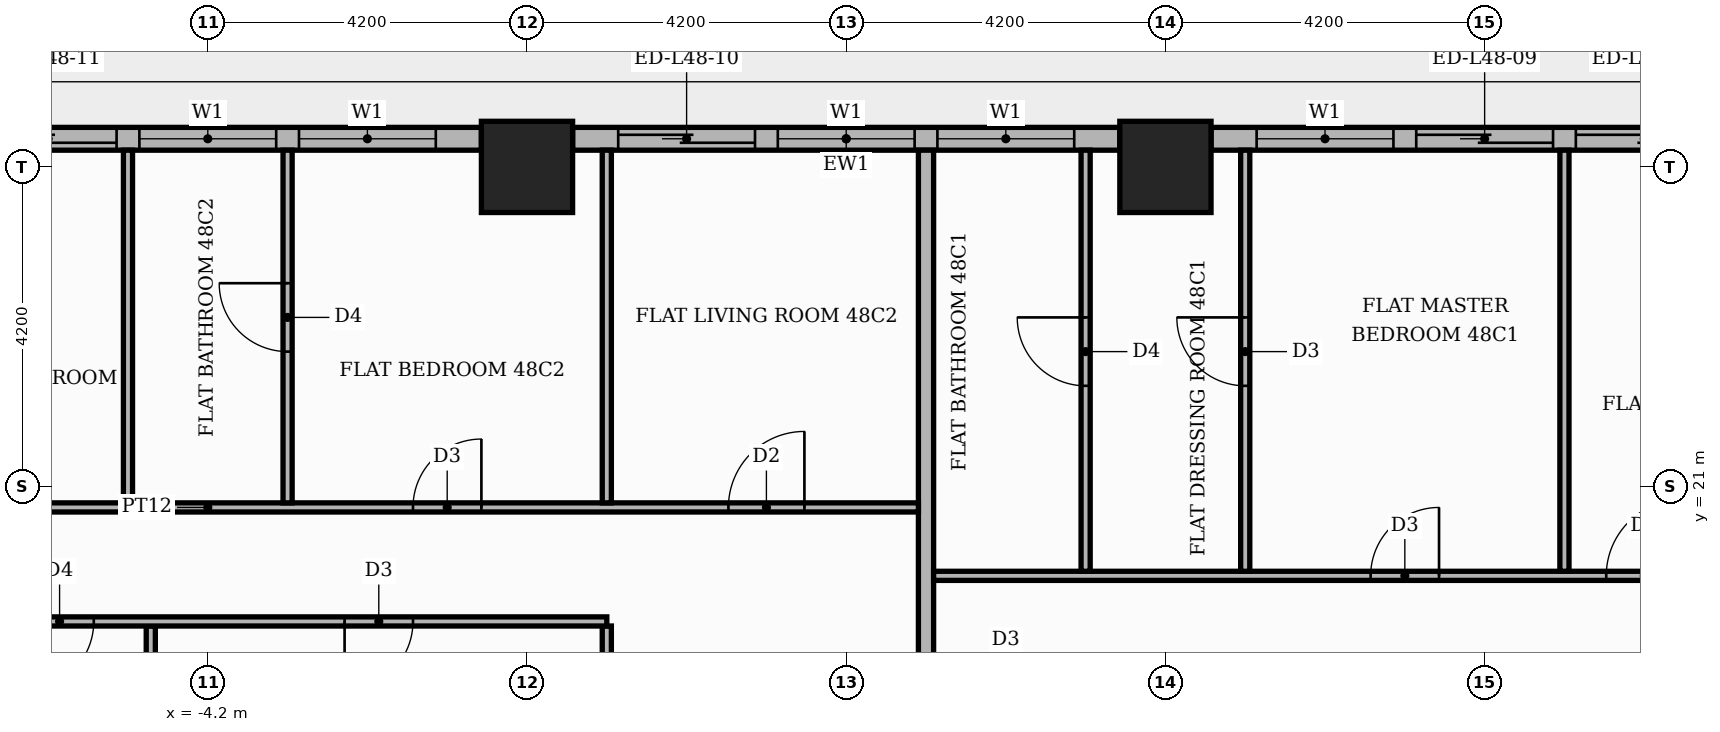
"""IFC4 building model, lengths in metres.
Left out: names, types, materials, properties, quantities, classifications, styles, units other than length and angle.
Written with IfcOpenShell. Run it as: python <this file> out.ifc"""

import sys

from ifc_helpers import new_model, si_unit, direction, frame, frame_2d, origin, origin_2d, place, context, subcontext, project, spatial, rectangle, extrude, element, fill, save


model = new_model("IFC4")
c1 = context("Model", 3, precision=1e-05, world=origin(), true_north=direction((0.0, 1.0)))
c2 = subcontext(c1, "Body", "Model", "MODEL_VIEW")
j1 = project(units=[si_unit("LENGTHUNIT", "METRE"), si_unit("PLANEANGLEUNIT", "RADIAN")], contexts=[c1])
p1 = place(None, origin())
s1 = spatial("IfcSite", under=j1, at=p1, CompositionType="ELEMENT")
p2 = place(p1, origin())
s2 = spatial("IfcBuilding", under=s1, at=p2, CompositionType="ELEMENT")
p3 = place(p2, frame((0.0, 0.0, 204.0)))
s3 = spatial("IfcBuildingStorey", under=s2, at=p3, CompositionType="ELEMENT", Elevation=204.0)
for number, where, z_axis, x_axis in (
    (1, (0.0, 25.2, 0.0), (0.0, 0.0, 1.0), (1.0, 0.0, 0.0)),
    (2, (8.4, 25.2, 0.0), (0.0, 0.0, 1.0), (1.0, 0.0, 0.0)),
):
    element("IfcColumn", number, at=place(p3, frame(where, z_axis=z_axis, x_axis=x_axis)), inside=s3, PredefinedType="COLUMN", context=c2, shape_type="SweptSolid", body=[
        extrude(rectangle(XDim=1.2, YDim=1.2, at=origin_2d()), origin(), (0.0, 0.0, 1.0), 3.9),
    ])
p4 = place(p3, frame((16.2, 25.57, 0.0), z_axis=(0.0, 0.0, 1.0), x_axis=(-1.0, 0.0, 0.0)))
e3 = element("IfcWall", 3, at=p4, inside=s3, PredefinedType="STANDARD", context=c2, shape_type="SweptSolid", body=[
    extrude(rectangle(XDim=7.2, YDim=0.3, at=frame_2d((3.6, 0.0))), origin(), (0.0, 0.0, 1.0), 3.48),
])
p5 = place(p4, frame((0.6, 0.0, 0.0)))
e4 = element("IfcOpeningElement", 4, at=p5, cuts=e3, PredefinedType="OPENING", context=c2, shape_type="SweptSolid", body=[
    extrude(rectangle(XDim=1.8, YDim=2.4, at=frame_2d((0.9, 1.2))), frame((0.0, 0.16, 0.0), z_axis=(0.0, -1.0, 0.0), x_axis=(1.0, 0.0, 0.0)), (0.0, 0.0, 1.0), 0.32),
])
p6 = place(p4, frame((2.7, 0.0, 0.0)))
e5 = element("IfcOpeningElement", 5, at=p6, cuts=e3, PredefinedType="OPENING", context=c2, shape_type="SweptSolid", body=[
    extrude(rectangle(XDim=1.8, YDim=2.4, at=frame_2d((0.9, 1.2))), frame((0.0, 0.16, 0.0), z_axis=(0.0, -1.0, 0.0), x_axis=(1.0, 0.0, 0.0)), (0.0, 0.0, 1.0), 0.32),
])
p7 = place(p4, frame((4.8, 0.0, 0.9)))
e6 = element("IfcOpeningElement", 6, at=p7, cuts=e3, PredefinedType="OPENING", context=c2, shape_type="SweptSolid", body=[
    extrude(rectangle(XDim=1.8, YDim=2.1, at=frame_2d((0.9, 1.05))), frame((0.0, 0.16, 0.0), z_axis=(0.0, -1.0, 0.0), x_axis=(1.0, 0.0, 0.0)), (0.0, 0.0, 1.0), 0.32),
])
p8 = place(p3, frame((7.8, 25.57, 0.0), z_axis=(0.0, 0.0, 1.0), x_axis=(-1.0, 0.0, 0.0)))
e7 = element("IfcWall", 7, at=p8, inside=s3, PredefinedType="STANDARD", context=c2, shape_type="SweptSolid", body=[
    extrude(rectangle(XDim=7.2, YDim=0.3, at=frame_2d((3.6, 0.0))), origin(), (0.0, 0.0, 1.0), 3.48),
])
p9 = place(p8, frame((0.6, 0.0, 0.9)))
e8 = element("IfcOpeningElement", 8, at=p9, cuts=e7, PredefinedType="OPENING", context=c2, shape_type="SweptSolid", body=[
    extrude(rectangle(XDim=1.8, YDim=2.1, at=frame_2d((0.9, 1.05))), frame((0.0, 0.16, 0.0), z_axis=(0.0, -1.0, 0.0), x_axis=(1.0, 0.0, 0.0)), (0.0, 0.0, 1.0), 0.32),
])
p10 = place(p8, frame((2.7, 0.0, 0.9)))
e9 = element("IfcOpeningElement", 9, at=p10, cuts=e7, PredefinedType="OPENING", context=c2, shape_type="SweptSolid", body=[
    extrude(rectangle(XDim=1.8, YDim=2.1, at=frame_2d((0.9, 1.05))), frame((0.0, 0.16, 0.0), z_axis=(0.0, -1.0, 0.0), x_axis=(1.0, 0.0, 0.0)), (0.0, 0.0, 1.0), 0.32),
])
p11 = place(p8, frame((4.8, 0.0, 0.0)))
e10 = element("IfcOpeningElement", 10, at=p11, cuts=e7, PredefinedType="OPENING", context=c2, shape_type="SweptSolid", body=[
    extrude(rectangle(XDim=1.8, YDim=2.4, at=frame_2d((0.9, 1.2))), frame((0.0, 0.16, 0.0), z_axis=(0.0, -1.0, 0.0), x_axis=(1.0, 0.0, 0.0)), (0.0, 0.0, 1.0), 0.32),
])
p12 = place(p3, frame((-0.6, 25.57, 0.0), z_axis=(0.0, 0.0, 1.0), x_axis=(-1.0, 0.0, 0.0)))
e11 = element("IfcWall", 11, at=p12, inside=s3, PredefinedType="STANDARD", context=c2, shape_type="SweptSolid", body=[
    extrude(rectangle(XDim=7.2, YDim=0.3, at=frame_2d((3.6, 0.0))), origin(), (0.0, 0.0, 1.0), 3.48),
])
p13 = place(p12, frame((0.6, 0.0, 0.9)))
e12 = element("IfcOpeningElement", 12, at=p13, cuts=e11, PredefinedType="OPENING", context=c2, shape_type="SweptSolid", body=[
    extrude(rectangle(XDim=1.8, YDim=2.1, at=frame_2d((0.9, 1.05))), frame((0.0, 0.16, 0.0), z_axis=(0.0, -1.0, 0.0), x_axis=(1.0, 0.0, 0.0)), (0.0, 0.0, 1.0), 0.32),
])
p14 = place(p12, frame((2.7, 0.0, 0.9)))
e13 = element("IfcOpeningElement", 13, at=p14, cuts=e11, PredefinedType="OPENING", context=c2, shape_type="SweptSolid", body=[
    extrude(rectangle(XDim=1.8, YDim=2.1, at=frame_2d((0.9, 1.05))), frame((0.0, 0.16, 0.0), z_axis=(0.0, -1.0, 0.0), x_axis=(1.0, 0.0, 0.0)), (0.0, 0.0, 1.0), 0.32),
])
p15 = place(p12, frame((4.8, 0.0, 0.0)))
e14 = element("IfcOpeningElement", 14, at=p15, cuts=e11, PredefinedType="OPENING", context=c2, shape_type="SweptSolid", body=[
    extrude(rectangle(XDim=1.8, YDim=2.4, at=frame_2d((0.9, 1.2))), frame((0.0, 0.16, 0.0), z_axis=(0.0, -1.0, 0.0), x_axis=(1.0, 0.0, 0.0)), (0.0, 0.0, 1.0), 0.32),
])
for number, where, z_axis, x_axis in (
    (15, (-4.95, 13.75, 0.0), (0.0, 0.0, 1.0), (0.0, 1.0, 0.0)),
    (16, (1.05, 13.75, 0.0), (0.0, 0.0, 1.0), (0.0, 1.0, 0.0)),
):
    element("IfcWall", number, at=place(p3, frame(where, z_axis=z_axis, x_axis=x_axis)), inside=s3, PredefinedType="PARTITIONING", context=c2, shape_type="SweptSolid", body=[
        extrude(rectangle(XDim=5.41, YDim=0.12, at=frame_2d((2.705, 0.0))), origin(), (0.0, 0.0, 1.0), 3.48),
    ])
p16 = place(p3, frame((5.25, 13.75, 0.0), z_axis=(0.0, 0.0, 1.0), x_axis=(0.0, 1.0, 0.0)))
e17 = element("IfcWall", 17, at=p16, inside=s3, PredefinedType="PARTITIONING", context=c2, shape_type="SweptSolid", body=[
    extrude(rectangle(XDim=11.67, YDim=0.2, at=frame_2d((5.835, 0.0))), origin(), (0.0, 0.0, 1.0), 3.48),
])
p17 = place(p3, frame((-13.55, 19.22, 0.0), z_axis=(0.0, 0.0, 1.0), x_axis=(1.0, 0.0, 0.0)))
e18 = element("IfcWall", 18, at=p17, inside=s3, PredefinedType="PARTITIONING", context=c2, shape_type="SweptSolid", body=[
    extrude(rectangle(XDim=14.6, YDim=0.12, at=frame_2d((7.3, 0.0))), origin(), (0.0, 0.0, 1.0), 3.48),
])
p18 = place(p17, frame((11.15, 0.0, 0.0)))
e19 = element("IfcOpeningElement", 19, at=p18, cuts=e18, PredefinedType="OPENING", context=c2, shape_type="SweptSolid", body=[
    extrude(rectangle(XDim=0.9, YDim=2.1, at=frame_2d((0.45, 1.05))), frame((0.0, 0.07, 0.0), z_axis=(0.0, -1.0, 0.0), x_axis=(1.0, 0.0, 0.0)), (0.0, 0.0, 1.0), 0.14),
])
p19 = place(p17, frame((6.95, 0.0, 0.0)))
e20 = element("IfcOpeningElement", 20, at=p19, cuts=e18, PredefinedType="OPENING", context=c2, shape_type="SweptSolid", body=[
    extrude(rectangle(XDim=0.9, YDim=2.1, at=frame_2d((0.45, 1.05))), frame((0.0, 0.07, 0.0), z_axis=(0.0, -1.0, 0.0), x_axis=(1.0, 0.0, 0.0)), (0.0, 0.0, 1.0), 0.14),
])
p20 = place(p17, frame((3.95, 0.0, 0.0)))
e21 = element("IfcOpeningElement", 21, at=p20, cuts=e18, PredefinedType="OPENING", context=c2, shape_type="SweptSolid", body=[
    extrude(rectangle(XDim=0.9, YDim=2.1, at=frame_2d((0.45, 1.05))), frame((0.0, 0.07, 0.0), z_axis=(0.0, -1.0, 0.0), x_axis=(1.0, 0.0, 0.0)), (0.0, 0.0, 1.0), 0.14),
])
p21 = place(p17, frame((0.8, 0.0, 0.0)))
e22 = element("IfcOpeningElement", 22, at=p21, cuts=e18, PredefinedType="OPENING", context=c2, shape_type="SweptSolid", body=[
    extrude(rectangle(XDim=0.9, YDim=2.1, at=frame_2d((0.45, 1.05))), frame((0.0, 0.07, 0.0), z_axis=(0.0, -1.0, 0.0), x_axis=(1.0, 0.0, 0.0)), (0.0, 0.0, 1.0), 0.14),
])
p22 = place(p3, frame((5.35, 19.82, 0.0), z_axis=(0.0, 0.0, 1.0), x_axis=(1.0, 0.0, 0.0)))
e23 = element("IfcWall", 23, at=p22, inside=s3, PredefinedType="PARTITIONING", context=c2, shape_type="SweptSolid", body=[
    extrude(rectangle(XDim=12.25, YDim=0.12, at=frame_2d((6.125, 0.0))), origin(), (0.0, 0.0, 1.0), 3.48),
])
p23 = place(p22, frame((8.85, 0.0, 0.0)))
e24 = element("IfcOpeningElement", 24, at=p23, cuts=e23, PredefinedType="OPENING", context=c2, shape_type="SweptSolid", body=[
    extrude(rectangle(XDim=1.0, YDim=2.1, at=frame_2d((0.5, 1.05))), frame((0.0, 0.07, 0.0), z_axis=(0.0, -1.0, 0.0), x_axis=(1.0, 0.0, 0.0)), (0.0, 0.0, 1.0), 0.14),
])
p24 = place(p22, frame((5.75, 0.0, 0.0)))
e25 = element("IfcOpeningElement", 25, at=p24, cuts=e23, PredefinedType="OPENING", context=c2, shape_type="SweptSolid", body=[
    extrude(rectangle(XDim=0.9, YDim=2.1, at=frame_2d((0.45, 1.05))), frame((0.0, 0.07, 0.0), z_axis=(0.0, -1.0, 0.0), x_axis=(1.0, 0.0, 0.0)), (0.0, 0.0, 1.0), 0.14),
])
p25 = place(p3, frame((7.35, 19.88, 0.0), z_axis=(0.0, 0.0, 1.0), x_axis=(0.0, 1.0, 0.0)))
e26 = element("IfcWall", 26, at=p25, inside=s3, PredefinedType="PARTITIONING", context=c2, shape_type="SweptSolid", body=[
    extrude(rectangle(XDim=5.54, YDim=0.12, at=frame_2d((2.77, 0.0))), origin(), (0.0, 0.0, 1.0), 3.48),
])
p26 = place(p25, frame((2.44, 0.0, 0.0)))
e27 = element("IfcOpeningElement", 27, at=p26, cuts=e26, PredefinedType="OPENING", context=c2, shape_type="SweptSolid", body=[
    extrude(rectangle(XDim=0.9, YDim=2.1, at=frame_2d((0.45, 1.05))), frame((0.0, 0.07, 0.0), z_axis=(0.0, -1.0, 0.0), x_axis=(1.0, 0.0, 0.0)), (0.0, 0.0, 1.0), 0.14),
])
p27 = place(p3, frame((9.45, 19.88, 0.0), z_axis=(0.0, 0.0, 1.0), x_axis=(0.0, 1.0, 0.0)))
e28 = element("IfcWall", 28, at=p27, inside=s3, PredefinedType="PARTITIONING", context=c2, shape_type="SweptSolid", body=[
    extrude(rectangle(XDim=5.54, YDim=0.12, at=frame_2d((2.77, 0.0))), origin(), (0.0, 0.0, 1.0), 3.48),
])
p28 = place(p27, frame((2.44, 0.0, 0.0)))
e29 = element("IfcOpeningElement", 29, at=p28, cuts=e28, PredefinedType="OPENING", context=c2, shape_type="SweptSolid", body=[
    extrude(rectangle(XDim=0.9, YDim=2.1, at=frame_2d((0.45, 1.05))), frame((0.0, 0.07, 0.0), z_axis=(0.0, -1.0, 0.0), x_axis=(1.0, 0.0, 0.0)), (0.0, 0.0, 1.0), 0.14),
])
p29 = place(p3, frame((13.65, 19.88, 0.0), z_axis=(0.0, 0.0, 1.0), x_axis=(0.0, 1.0, 0.0)))
e30 = element("IfcWall", 30, at=p29, inside=s3, PredefinedType="PARTITIONING", context=c2, shape_type="SweptSolid", body=[
    extrude(rectangle(XDim=5.54, YDim=0.12, at=frame_2d((2.77, 0.0))), origin(), (0.0, 0.0, 1.0), 3.48),
])
p30 = place(p3, frame((-13.55, 20.72, 0.0), z_axis=(0.0, 0.0, 1.0), x_axis=(1.0, 0.0, 0.0)))
e31 = element("IfcWall", 31, at=p30, inside=s3, PredefinedType="PARTITIONING", context=c2, shape_type="SweptSolid", body=[
    extrude(rectangle(XDim=18.7, YDim=0.12, at=frame_2d((9.35, 0.0))), origin(), (0.0, 0.0, 1.0), 3.48),
])
p31 = place(p30, frame((16.2, 0.0, 0.0)))
e32 = element("IfcOpeningElement", 32, at=p31, cuts=e31, PredefinedType="OPENING", context=c2, shape_type="SweptSolid", body=[
    extrude(rectangle(XDim=1.0, YDim=2.1, at=frame_2d((0.5, 1.05))), frame((0.0, 0.07, 0.0), z_axis=(0.0, -1.0, 0.0), x_axis=(1.0, 0.0, 0.0)), (0.0, 0.0, 1.0), 0.14),
])
p32 = place(p30, frame((12.05, 0.0, 0.0)))
e33 = element("IfcOpeningElement", 33, at=p32, cuts=e31, PredefinedType="OPENING", context=c2, shape_type="SweptSolid", body=[
    extrude(rectangle(XDim=0.9, YDim=2.1, at=frame_2d((0.45, 1.05))), frame((0.0, 0.07, 0.0), z_axis=(0.0, -1.0, 0.0), x_axis=(1.0, 0.0, 0.0)), (0.0, 0.0, 1.0), 0.14),
])
p33 = place(p30, frame((5.75, 0.0, 0.0)))
e34 = element("IfcOpeningElement", 34, at=p33, cuts=e31, PredefinedType="OPENING", context=c2, shape_type="SweptSolid", body=[
    extrude(rectangle(XDim=0.9, YDim=2.1, at=frame_2d((0.45, 1.05))), frame((0.0, 0.07, 0.0), z_axis=(0.0, -1.0, 0.0), x_axis=(1.0, 0.0, 0.0)), (0.0, 0.0, 1.0), 0.14),
])
p34 = place(p3, frame((-5.25, 20.78, 0.0), z_axis=(0.0, 0.0, 1.0), x_axis=(0.0, 1.0, 0.0)))
e35 = element("IfcWall", 35, at=p34, inside=s3, PredefinedType="PARTITIONING", context=c2, shape_type="SweptSolid", body=[
    extrude(rectangle(XDim=4.64, YDim=0.12, at=frame_2d((2.32, 0.0))), origin(), (0.0, 0.0, 1.0), 3.48),
])
p35 = place(p3, frame((-3.15, 20.78, 0.0), z_axis=(0.0, 0.0, 1.0), x_axis=(0.0, 1.0, 0.0)))
e36 = element("IfcWall", 36, at=p35, inside=s3, PredefinedType="PARTITIONING", context=c2, shape_type="SweptSolid", body=[
    extrude(rectangle(XDim=4.64, YDim=0.12, at=frame_2d((2.32, 0.0))), origin(), (0.0, 0.0, 1.0), 3.48),
])
p36 = place(p35, frame((1.99, 0.0, 0.0)))
e37 = element("IfcOpeningElement", 37, at=p36, cuts=e36, PredefinedType="OPENING", context=c2, shape_type="SweptSolid", body=[
    extrude(rectangle(XDim=0.9, YDim=2.1, at=frame_2d((0.45, 1.05))), frame((0.0, 0.07, 0.0), z_axis=(0.0, -1.0, 0.0), x_axis=(1.0, 0.0, 0.0)), (0.0, 0.0, 1.0), 0.14),
])
p37 = place(p3, frame((1.05, 20.78, 0.0), z_axis=(0.0, 0.0, 1.0), x_axis=(0.0, 1.0, 0.0)))
e38 = element("IfcWall", 38, at=p37, inside=s3, PredefinedType="PARTITIONING", context=c2, shape_type="SweptSolid", body=[
    extrude(rectangle(XDim=4.64, YDim=0.12, at=frame_2d((2.32, 0.0))), origin(), (0.0, 0.0, 1.0), 3.48),
])
p38 = place(p5, origin())
e39 = element("IfcDoor", 39, at=p38, inside=s3, OperationType="SLIDING_TO_LEFT", PredefinedType="DOOR", context=c2, shape_type="SweptSolid", body=[
    extrude(rectangle(XDim=1.8, YDim=2.4, at=frame_2d((0.9, 1.2))), frame((0.0, 0.025, 0.0), z_axis=(0.0, -1.0, 0.0), x_axis=(1.0, 0.0, 0.0)), (0.0, 0.0, 1.0), 0.05),
])
fill(e4, e39)
p39 = place(p6, origin())
e40 = element("IfcDoor", 40, at=p39, inside=s3, OperationType="SLIDING_TO_RIGHT", PredefinedType="DOOR", context=c2, shape_type="SweptSolid", body=[
    extrude(rectangle(XDim=1.8, YDim=2.4, at=frame_2d((0.9, 1.2))), frame((0.0, 0.025, 0.0), z_axis=(0.0, -1.0, 0.0), x_axis=(1.0, 0.0, 0.0)), (0.0, 0.0, 1.0), 0.05),
])
fill(e5, e40)
p40 = place(p7, origin())
e41 = element("IfcWindow", 41, at=p40, inside=s3, PartitioningType="SINGLE_PANEL", PredefinedType="WINDOW", context=c2, shape_type="SweptSolid", body=[
    extrude(rectangle(XDim=1.8, YDim=2.1, at=frame_2d((0.9, 1.05))), frame((0.0, 0.03, 0.0), z_axis=(0.0, -1.0, 0.0), x_axis=(1.0, 0.0, 0.0)), (0.0, 0.0, 1.0), 0.06),
])
fill(e6, e41)
p41 = place(p9, origin())
e42 = element("IfcWindow", 42, at=p41, inside=s3, PartitioningType="SINGLE_PANEL", PredefinedType="WINDOW", context=c2, shape_type="SweptSolid", body=[
    extrude(rectangle(XDim=1.8, YDim=2.1, at=frame_2d((0.9, 1.05))), frame((0.0, 0.03, 0.0), z_axis=(0.0, -1.0, 0.0), x_axis=(1.0, 0.0, 0.0)), (0.0, 0.0, 1.0), 0.06),
])
fill(e8, e42)
p42 = place(p10, origin())
e43 = element("IfcWindow", 43, at=p42, inside=s3, PartitioningType="SINGLE_PANEL", PredefinedType="WINDOW", context=c2, shape_type="SweptSolid", body=[
    extrude(rectangle(XDim=1.8, YDim=2.1, at=frame_2d((0.9, 1.05))), frame((0.0, 0.03, 0.0), z_axis=(0.0, -1.0, 0.0), x_axis=(1.0, 0.0, 0.0)), (0.0, 0.0, 1.0), 0.06),
])
fill(e9, e43)
p43 = place(p11, origin())
e44 = element("IfcDoor", 44, at=p43, inside=s3, OperationType="SLIDING_TO_RIGHT", PredefinedType="DOOR", context=c2, shape_type="SweptSolid", body=[
    extrude(rectangle(XDim=1.8, YDim=2.4, at=frame_2d((0.9, 1.2))), frame((0.0, 0.025, 0.0), z_axis=(0.0, -1.0, 0.0), x_axis=(1.0, 0.0, 0.0)), (0.0, 0.0, 1.0), 0.05),
])
fill(e10, e44)
p44 = place(p13, origin())
e45 = element("IfcWindow", 45, at=p44, inside=s3, PartitioningType="SINGLE_PANEL", PredefinedType="WINDOW", context=c2, shape_type="SweptSolid", body=[
    extrude(rectangle(XDim=1.8, YDim=2.1, at=frame_2d((0.9, 1.05))), frame((0.0, 0.03, 0.0), z_axis=(0.0, -1.0, 0.0), x_axis=(1.0, 0.0, 0.0)), (0.0, 0.0, 1.0), 0.06),
])
fill(e12, e45)
p45 = place(p14, origin())
e46 = element("IfcWindow", 46, at=p45, inside=s3, PartitioningType="SINGLE_PANEL", PredefinedType="WINDOW", context=c2, shape_type="SweptSolid", body=[
    extrude(rectangle(XDim=1.8, YDim=2.1, at=frame_2d((0.9, 1.05))), frame((0.0, 0.03, 0.0), z_axis=(0.0, -1.0, 0.0), x_axis=(1.0, 0.0, 0.0)), (0.0, 0.0, 1.0), 0.06),
])
fill(e13, e46)
p46 = place(p15, origin())
e47 = element("IfcDoor", 47, at=p46, inside=s3, OperationType="SLIDING_TO_RIGHT", PredefinedType="DOOR", context=c2, shape_type="SweptSolid", body=[
    extrude(rectangle(XDim=1.8, YDim=2.4, at=frame_2d((0.9, 1.2))), frame((0.0, 0.025, 0.0), z_axis=(0.0, -1.0, 0.0), x_axis=(1.0, 0.0, 0.0)), (0.0, 0.0, 1.0), 0.05),
])
fill(e14, e47)
p47 = place(p23, origin())
e48 = element("IfcDoor", 48, at=p47, inside=s3, OperationType="SINGLE_SWING_RIGHT", PredefinedType="DOOR", context=c2, shape_type="SweptSolid", body=[
    extrude(rectangle(XDim=1.0, YDim=2.1, at=frame_2d((0.5, 1.05))), frame((0.0, 0.025, 0.0), z_axis=(0.0, -1.0, 0.0), x_axis=(1.0, 0.0, 0.0)), (0.0, 0.0, 1.0), 0.05),
])
fill(e24, e48)
p48 = place(p24, origin())
e49 = element("IfcDoor", 49, at=p48, inside=s3, OperationType="SINGLE_SWING_RIGHT", PredefinedType="DOOR", context=c2, shape_type="SweptSolid", body=[
    extrude(rectangle(XDim=0.9, YDim=2.1, at=frame_2d((0.45, 1.05))), frame((0.0, 0.025, 0.0), z_axis=(0.0, -1.0, 0.0), x_axis=(1.0, 0.0, 0.0)), (0.0, 0.0, 1.0), 0.05),
])
fill(e25, e49)
p49 = place(p28, origin())
e50 = element("IfcDoor", 50, at=p49, inside=s3, OperationType="SINGLE_SWING_RIGHT", PredefinedType="DOOR", context=c2, shape_type="SweptSolid", body=[
    extrude(rectangle(XDim=0.9, YDim=2.1, at=frame_2d((0.45, 1.05))), frame((0.0, 0.025, 0.0), z_axis=(0.0, -1.0, 0.0), x_axis=(1.0, 0.0, 0.0)), (0.0, 0.0, 1.0), 0.05),
])
fill(e29, e50)
p50 = place(p26, origin())
e51 = element("IfcDoor", 51, at=p50, inside=s3, OperationType="SINGLE_SWING_RIGHT", PredefinedType="DOOR", context=c2, shape_type="SweptSolid", body=[
    extrude(rectangle(XDim=0.9, YDim=2.1, at=frame_2d((0.45, 1.05))), frame((0.0, 0.025, 0.0), z_axis=(0.0, -1.0, 0.0), x_axis=(1.0, 0.0, 0.0)), (0.0, 0.0, 1.0), 0.05),
])
fill(e27, e51)
p51 = place(p18, frame((0.9, 0.0, 0.0), z_axis=(0.0, 0.0, 1.0), x_axis=(-1.0, 0.0, 0.0)))
e52 = element("IfcDoor", 52, at=p51, inside=s3, OperationType="SINGLE_SWING_LEFT", PredefinedType="DOOR", context=c2, shape_type="SweptSolid", body=[
    extrude(rectangle(XDim=0.9, YDim=2.1, at=frame_2d((0.45, 1.05))), frame((0.0, 0.025, 0.0), z_axis=(0.0, -1.0, 0.0), x_axis=(1.0, 0.0, 0.0)), (0.0, 0.0, 1.0), 0.05),
])
fill(e19, e52)
p52 = place(p19, frame((0.9, 0.0, 0.0), z_axis=(0.0, 0.0, 1.0), x_axis=(-1.0, 0.0, 0.0)))
e53 = element("IfcDoor", 53, at=p52, inside=s3, OperationType="SINGLE_SWING_LEFT", PredefinedType="DOOR", context=c2, shape_type="SweptSolid", body=[
    extrude(rectangle(XDim=0.9, YDim=2.1, at=frame_2d((0.45, 1.05))), frame((0.0, 0.025, 0.0), z_axis=(0.0, -1.0, 0.0), x_axis=(1.0, 0.0, 0.0)), (0.0, 0.0, 1.0), 0.05),
])
fill(e20, e53)
p53 = place(p31, origin())
e54 = element("IfcDoor", 54, at=p53, inside=s3, OperationType="SINGLE_SWING_RIGHT", PredefinedType="DOOR", context=c2, shape_type="SweptSolid", body=[
    extrude(rectangle(XDim=1.0, YDim=2.1, at=frame_2d((0.5, 1.05))), frame((0.0, 0.025, 0.0), z_axis=(0.0, -1.0, 0.0), x_axis=(1.0, 0.0, 0.0)), (0.0, 0.0, 1.0), 0.05),
])
fill(e32, e54)
p54 = place(p32, origin())
e55 = element("IfcDoor", 55, at=p54, inside=s3, OperationType="SINGLE_SWING_RIGHT", PredefinedType="DOOR", context=c2, shape_type="SweptSolid", body=[
    extrude(rectangle(XDim=0.9, YDim=2.1, at=frame_2d((0.45, 1.05))), frame((0.0, 0.025, 0.0), z_axis=(0.0, -1.0, 0.0), x_axis=(1.0, 0.0, 0.0)), (0.0, 0.0, 1.0), 0.05),
])
fill(e33, e55)
p55 = place(p36, origin())
e56 = element("IfcDoor", 56, at=p55, inside=s3, OperationType="SINGLE_SWING_RIGHT", PredefinedType="DOOR", context=c2, shape_type="SweptSolid", body=[
    extrude(rectangle(XDim=0.9, YDim=2.1, at=frame_2d((0.45, 1.05))), frame((0.0, 0.025, 0.0), z_axis=(0.0, -1.0, 0.0), x_axis=(1.0, 0.0, 0.0)), (0.0, 0.0, 1.0), 0.05),
])
fill(e37, e56)
save(model, sys.argv[1])
